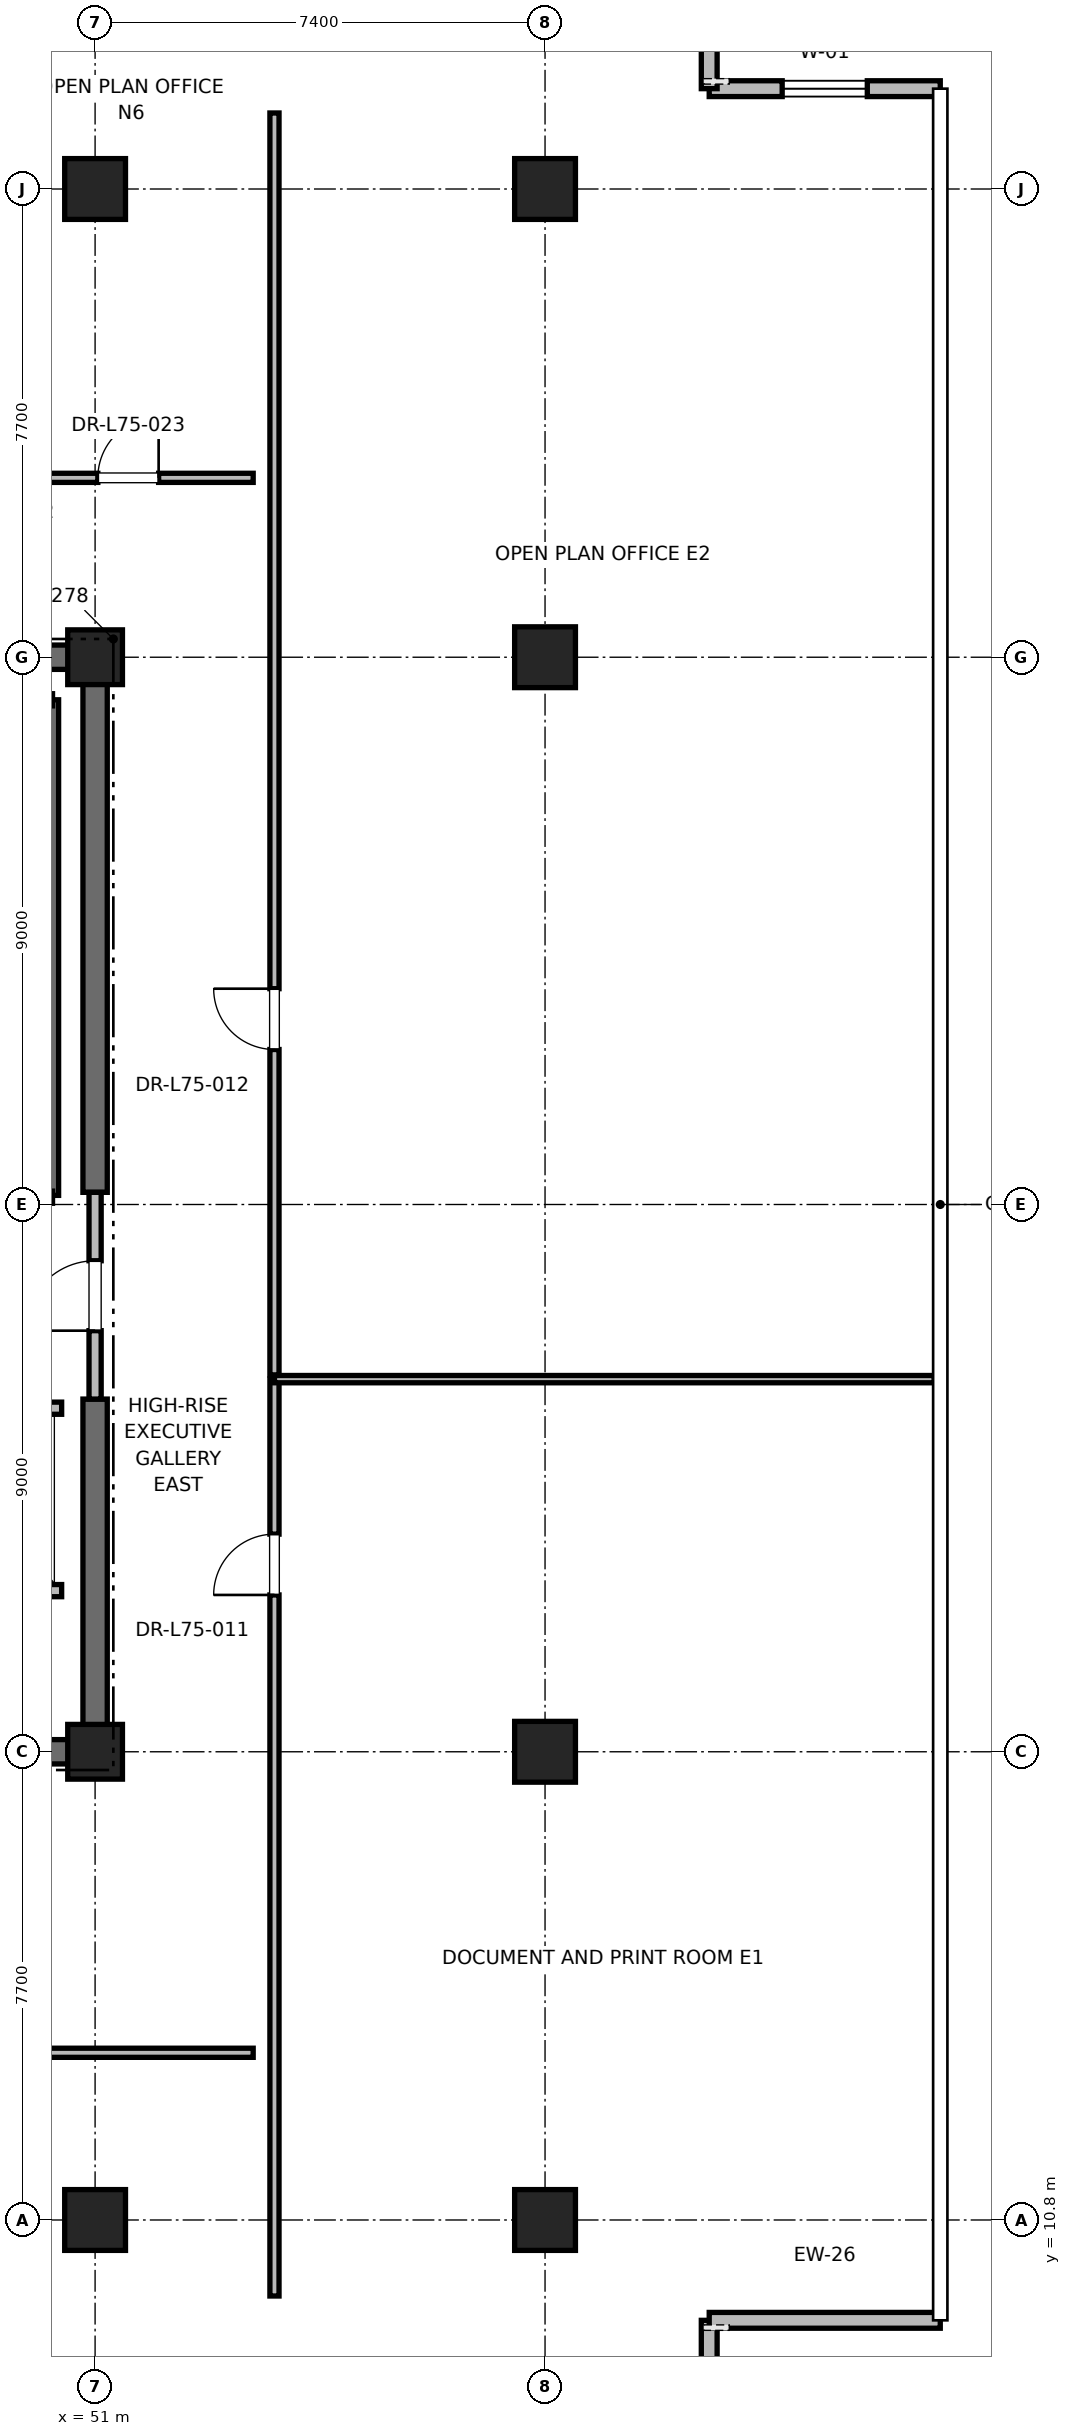
"""IFC4 building model, lengths in metres.
Left out: names, types, materials, properties, quantities, classifications, styles, units other than length and angle.
Written with IfcOpenShell. Run it as: python <this file> out.ifc"""

import sys

from ifc_helpers import new_model, si_unit, direction, frame, frame_2d, origin, origin_2d, place, context, subcontext, project, spatial, rectangle, extrude, element, fill, save


model = new_model("IFC4")
c1 = context("Model", 3, precision=1e-05, world=origin(), true_north=direction((0.0, 1.0)))
c2 = subcontext(c1, "Body", "Model", "MODEL_VIEW")
j1 = project(units=[si_unit("LENGTHUNIT", "METRE"), si_unit("PLANEANGLEUNIT", "RADIAN")], contexts=[c1])
p1 = place(None, origin())
s1 = spatial("IfcSite", under=j1, at=p1, CompositionType="ELEMENT")
p2 = place(p1, origin())
s2 = spatial("IfcBuilding", under=s1, at=p2, CompositionType="ELEMENT")
p3 = place(p2, frame((0.0, 0.0, 322.8)))
s3 = spatial("IfcBuildingStorey", under=s2, at=p3, CompositionType="ELEMENT", Elevation=322.8)
for number, where, z_axis, x_axis in (
    (1, (51.0, 10.8, 0.0), (0.0, 0.0, 1.0), (1.0, 0.0, 0.0)),
    (2, (51.0, 44.2, 0.0), (0.0, 0.0, 1.0), (1.0, 0.0, 0.0)),
    (3, (58.4, 18.5, 0.0), (0.0, 0.0, 1.0), (1.0, 0.0, 0.0)),
    (4, (58.4, 36.5, 0.0), (0.0, 0.0, 1.0), (1.0, 0.0, 0.0)),
    (5, (58.4, 10.8, 0.0), (0.0, 0.0, 1.0), (1.0, 0.0, 0.0)),
    (6, (58.4, 44.2, 0.0), (0.0, 0.0, 1.0), (1.0, 0.0, 0.0)),
):
    element("IfcColumn", number, at=place(p3, frame(where, z_axis=z_axis, x_axis=x_axis)), inside=s3, PredefinedType="COLUMN", context=c2, shape_type="SweptSolid", body=[
        extrude(rectangle(XDim=1.0, YDim=1.0, at=origin_2d()), origin(), (0.0, 0.0, 1.0), 4.0),
    ])
for number, where, z_axis, x_axis in (
    (7, (51.0, 18.5, 0.0), (0.0, 0.0, 1.0), (1.0, 0.0, 0.0)),
    (8, (51.0, 36.5, 0.0), (0.0, 0.0, 1.0), (1.0, 0.0, 0.0)),
):
    element("IfcColumn", number, at=place(p3, frame(where, z_axis=z_axis, x_axis=x_axis)), inside=s3, PredefinedType="PILASTER", context=c2, shape_type="SweptSolid", body=[
        extrude(rectangle(XDim=0.9, YDim=0.9, at=origin_2d()), origin(), (0.0, 0.0, 1.0), 4.0),
    ])
p4 = place(p3, frame((41.8, 18.5, 0.0), z_axis=(0.0, 0.0, 1.0), x_axis=(1.0, 0.0, 0.0)))
e9 = element("IfcWall", 9, at=p4, inside=s3, PredefinedType="SHEAR", context=c2, shape_type="SweptSolid", body=[
    extrude(rectangle(XDim=9.2, YDim=0.4, at=frame_2d((4.6, 0.0))), origin(), (0.0, 0.0, 1.0), 3.785),
])
for number, where, z_axis, x_axis in (
    (10, (45.2, 36.5, 0.0), (0.0, 0.0, 1.0), (1.0, 0.0, 0.0)),
    (11, (51.0, 18.5, 0.0), (0.0, 0.0, 1.0), (0.0, 1.0, 0.0)),
):
    element("IfcWall", number, at=place(p3, frame(where, z_axis=z_axis, x_axis=x_axis)), inside=s3, PredefinedType="SHEAR", context=c2, shape_type="SweptSolid", body=[
        extrude(rectangle(XDim=5.8, YDim=0.4, at=frame_2d((2.9, 0.0))), origin(), (0.0, 0.0, 1.0), 3.785),
    ])
p5 = place(p3, frame((51.0, 27.7, 0.0), z_axis=(0.0, 0.0, 1.0), x_axis=(0.0, 1.0, 0.0)))
e12 = element("IfcWall", 12, at=p5, inside=s3, PredefinedType="SHEAR", context=c2, shape_type="SweptSolid", body=[
    extrude(rectangle(XDim=8.8, YDim=0.4, at=frame_2d((4.4, 0.0))), origin(), (0.0, 0.0, 1.0), 3.785),
])
p6 = place(p3, frame((61.1, 5.85, 0.0), z_axis=(0.0, 0.0, 1.0), x_axis=(0.0, 1.0, 0.0)))
e13 = element("IfcWall", 13, at=p6, inside=s3, PredefinedType="PARAPET", context=c2, shape_type="SweptSolid", body=[
    extrude(rectangle(XDim=3.3, YDim=0.26, at=frame_2d((1.65, 0.0))), origin(), (0.0, 0.0, 1.0), 3.785),
])
p7 = place(p6, frame((0.95, 0.0, 0.85)))
e14 = element("IfcOpeningElement", 14, at=p7, cuts=e13, PredefinedType="OPENING", context=c2, shape_type="SweptSolid", body=[
    extrude(rectangle(XDim=1.4, YDim=2.0, at=frame_2d((0.7, 1.0))), frame((0.0, 0.13, 0.0), z_axis=(0.0, -1.0, 0.0), x_axis=(1.0, 0.0, 0.0)), (0.0, 0.0, 1.0), 0.26),
])
p8 = place(p3, frame((61.1, 9.15, 0.0), z_axis=(0.0, 0.0, 1.0), x_axis=(1.0, 0.0, 0.0)))
e15 = element("IfcWall", 15, at=p8, inside=s3, PredefinedType="PARAPET", context=c2, shape_type="SweptSolid", body=[
    extrude(rectangle(XDim=3.8, YDim=0.26, at=frame_2d((1.9, 0.0))), origin(), (0.0, 0.0, 1.0), 3.785),
])
p9 = place(p3, frame((64.9, 45.85, 0.0), z_axis=(0.0, 0.0, 1.0), x_axis=(-1.0, 0.0, 0.0)))
e16 = element("IfcWall", 16, at=p9, inside=s3, PredefinedType="PARAPET", context=c2, shape_type="SweptSolid", body=[
    extrude(rectangle(XDim=3.8, YDim=0.26, at=frame_2d((1.9, 0.0))), origin(), (0.0, 0.0, 1.0), 3.785),
])
p10 = place(p9, frame((1.2, 0.0, 0.85)))
e17 = element("IfcOpeningElement", 17, at=p10, cuts=e16, PredefinedType="OPENING", context=c2, shape_type="SweptSolid", body=[
    extrude(rectangle(XDim=1.4, YDim=2.0, at=frame_2d((0.7, 1.0))), frame((0.0, 0.13, 0.0), z_axis=(0.0, -1.0, 0.0), x_axis=(1.0, 0.0, 0.0)), (0.0, 0.0, 1.0), 0.26),
])
p11 = place(p3, frame((61.1, 45.85, 0.0), z_axis=(0.0, 0.0, 1.0), x_axis=(0.0, 1.0, 0.0)))
e18 = element("IfcWall", 18, at=p11, inside=s3, PredefinedType="PARAPET", context=c2, shape_type="SweptSolid", body=[
    extrude(rectangle(XDim=3.3, YDim=0.26, at=frame_2d((1.65, 0.0))), origin(), (0.0, 0.0, 1.0), 3.785),
])
p12 = place(p3, frame((50.3, 27.65, 0.0), z_axis=(0.0, 0.0, 1.0), x_axis=(0.0, 1.0, 0.0)))
e19 = element("IfcWall", 19, at=p12, inside=s3, PredefinedType="SOLIDWALL", context=c2, shape_type="SweptSolid", body=[
    extrude(rectangle(XDim=8.15, YDim=0.2, at=frame_2d((4.075, 0.0))), origin(), (0.0, 0.0, 1.0), 3.785),
])
p13 = place(p3, frame((51.0, 24.3, 0.0), z_axis=(0.0, 0.0, 1.0), x_axis=(0.0, 1.0, 0.0)))
e20 = element("IfcWall", 20, at=p13, inside=s3, PredefinedType="PARTITIONING", context=c2, shape_type="SweptSolid", body=[
    extrude(rectangle(XDim=3.4, YDim=0.2, at=frame_2d((1.7, 0.0))), origin(), (0.0, 0.0, 1.0), 2.865),
])
p14 = place(p13, frame((1.125, 0.0, 0.0)))
e21 = element("IfcOpeningElement", 21, at=p14, cuts=e20, PredefinedType="OPENING", context=c2, shape_type="SweptSolid", body=[
    extrude(rectangle(XDim=1.15, YDim=2.2, at=frame_2d((0.575, 1.1))), frame((0.0, 0.1, 0.0), z_axis=(0.0, -1.0, 0.0), x_axis=(1.0, 0.0, 0.0)), (0.0, 0.0, 1.0), 0.2),
])
p15 = place(p3, frame((47.85, 21.15, 0.0), z_axis=(0.0, 0.0, 1.0), x_axis=(1.0, 0.0, 0.0)))
e22 = element("IfcWall", 22, at=p15, inside=s3, PredefinedType="SOLIDWALL", context=c2, shape_type="SweptSolid", body=[
    extrude(rectangle(XDim=2.6, YDim=0.2, at=frame_2d((1.3, 0.0))), origin(), (0.0, 0.0, 1.0), 3.785),
])
p16 = place(p3, frame((50.45, 24.15, 0.0), z_axis=(0.0, 0.0, 1.0), x_axis=(-1.0, 0.0, 0.0)))
e23 = element("IfcWall", 23, at=p16, inside=s3, PredefinedType="SOLIDWALL", context=c2, shape_type="SweptSolid", body=[
    extrude(rectangle(XDim=2.6, YDim=0.2, at=frame_2d((1.3, 0.0))), origin(), (0.0, 0.0, 1.0), 2.865),
])
p17 = place(p16, frame((0.75, 0.0, 0.0)))
e24 = element("IfcOpeningElement", 24, at=p17, cuts=e23, PredefinedType="OPENING", context=c2, shape_type="SweptSolid", body=[
    extrude(rectangle(XDim=1.1, YDim=2.2, at=frame_2d((0.55, 1.1))), frame((0.0, 0.1, 0.0), z_axis=(0.0, -1.0, 0.0), x_axis=(1.0, 0.0, 0.0)), (0.0, 0.0, 1.0), 0.2),
])
p18 = place(p3, frame((49.59, 39.45, 0.0), z_axis=(0.0, 0.0, 1.0), x_axis=(1.0, 0.0, 0.0)))
e25 = element("IfcWall", 25, at=p18, inside=s3, PredefinedType="PARTITIONING", context=c2, shape_type="SweptSolid", body=[
    extrude(rectangle(XDim=4.01, YDim=0.15, at=frame_2d((2.005, 0.0))), origin(), (0.0, 0.0, 1.0), 2.85),
])
p19 = place(p18, frame((1.455, 0.0, 0.0)))
e26 = element("IfcOpeningElement", 26, at=p19, cuts=e25, PredefinedType="OPENING", context=c2, shape_type="SweptSolid", body=[
    extrude(rectangle(XDim=1.0, YDim=2.15, at=frame_2d((0.5, 1.075))), frame((0.0, 0.075, 0.0), z_axis=(0.0, -1.0, 0.0), x_axis=(1.0, 0.0, 0.0)), (0.0, 0.0, 1.0), 0.15),
])
p20 = place(p3, frame((44.694, 13.55, 0.0), z_axis=(0.0, 0.0, 1.0), x_axis=(1.0, 0.0, 0.0)))
e27 = element("IfcWall", 27, at=p20, inside=s3, PredefinedType="PARTITIONING", context=c2, shape_type="SweptSolid", body=[
    extrude(rectangle(XDim=8.906, YDim=0.15, at=frame_2d((4.453, 0.0))), origin(), (0.0, 0.0, 1.0), 2.85),
])
p21 = place(p20, frame((3.903, 0.0, 0.0)))
e28 = element("IfcOpeningElement", 28, at=p21, cuts=e27, PredefinedType="OPENING", context=c2, shape_type="SweptSolid", body=[
    extrude(rectangle(XDim=1.0, YDim=2.15, at=frame_2d((0.5, 1.075))), frame((0.0, 0.075, 0.0), z_axis=(0.0, -1.0, 0.0), x_axis=(1.0, 0.0, 0.0)), (0.0, 0.0, 1.0), 0.15),
])
p22 = place(p3, frame((53.95, 9.55, 0.0), z_axis=(0.0, 0.0, 1.0), x_axis=(0.0, 1.0, 0.0)))
e29 = element("IfcWall", 29, at=p22, inside=s3, PredefinedType="PARTITIONING", context=c2, shape_type="SweptSolid", body=[
    extrude(rectangle(XDim=15.078, YDim=0.15, at=frame_2d((7.539, 0.0))), origin(), (0.0, 0.0, 1.0), 2.85),
])
p23 = place(p22, frame((11.529, 0.0, 0.0)))
e30 = element("IfcOpeningElement", 30, at=p23, cuts=e29, PredefinedType="OPENING", context=c2, shape_type="SweptSolid", body=[
    extrude(rectangle(XDim=1.0, YDim=2.15, at=frame_2d((0.5, 1.075))), frame((0.0, 0.075, 0.0), z_axis=(0.0, -1.0, 0.0), x_axis=(1.0, 0.0, 0.0)), (0.0, 0.0, 1.0), 0.15),
])
p24 = place(p3, frame((53.95, 24.628, 0.0), z_axis=(0.0, 0.0, 1.0), x_axis=(1.0, 0.0, 0.0)))
e31 = element("IfcWall", 31, at=p24, inside=s3, PredefinedType="PARTITIONING", context=c2, shape_type="SweptSolid", body=[
    extrude(rectangle(XDim=10.85, YDim=0.12, at=frame_2d((5.425, 0.0))), origin(), (0.0, 0.0, 1.0), 2.85),
])
p25 = place(p3, frame((53.95, 24.698, 0.0), z_axis=(0.0, 0.0, 1.0), x_axis=(0.0, 1.0, 0.0)))
e32 = element("IfcWall", 32, at=p25, inside=s3, PredefinedType="PARTITIONING", context=c2, shape_type="SweptSolid", body=[
    extrude(rectangle(XDim=20.752, YDim=0.15, at=frame_2d((10.376, 0.0))), origin(), (0.0, 0.0, 1.0), 2.85),
])
p26 = place(p25, frame((5.351, 0.0, 0.0)))
e33 = element("IfcOpeningElement", 33, at=p26, cuts=e32, PredefinedType="OPENING", context=c2, shape_type="SweptSolid", body=[
    extrude(rectangle(XDim=1.0, YDim=2.15, at=frame_2d((0.5, 1.075))), frame((0.0, 0.075, 0.0), z_axis=(0.0, -1.0, 0.0), x_axis=(1.0, 0.0, 0.0)), (0.0, 0.0, 1.0), 0.15),
])
p27 = place(p10, origin())
e34 = element("IfcWindow", 34, at=p27, inside=s3, PartitioningType="SINGLE_PANEL", PredefinedType="WINDOW", context=c2, shape_type="SweptSolid", body=[
    extrude(rectangle(XDim=1.4, YDim=2.0, at=frame_2d((0.7, 1.0))), frame((0.0, 0.03, 0.0), z_axis=(0.0, -1.0, 0.0), x_axis=(1.0, 0.0, 0.0)), (0.0, 0.0, 1.0), 0.06),
])
fill(e17, e34)
p28 = place(p14, origin())
e35 = element("IfcDoor", 35, at=p28, inside=s3, OperationType="SINGLE_SWING_LEFT", PredefinedType="DOOR", context=c2, shape_type="SweptSolid", body=[
    extrude(rectangle(XDim=1.15, YDim=2.2, at=frame_2d((0.575, 1.1))), frame((0.0, 0.025, 0.0), z_axis=(0.0, -1.0, 0.0), x_axis=(1.0, 0.0, 0.0)), (0.0, 0.0, 1.0), 0.05),
])
fill(e21, e35)
p29 = place(p19, origin())
e36 = element("IfcDoor", 36, at=p29, inside=s3, OperationType="SINGLE_SWING_RIGHT", PredefinedType="DOOR", context=c2, shape_type="SweptSolid", body=[
    extrude(rectangle(XDim=1.0, YDim=2.15, at=frame_2d((0.5, 1.075))), frame((0.0, 0.025, 0.0), z_axis=(0.0, -1.0, 0.0), x_axis=(1.0, 0.0, 0.0)), (0.0, 0.0, 1.0), 0.05),
])
fill(e26, e36)
p30 = place(p23, origin())
e37 = element("IfcDoor", 37, at=p30, inside=s3, OperationType="SINGLE_SWING_LEFT", PredefinedType="DOOR", context=c2, shape_type="SweptSolid", body=[
    extrude(rectangle(XDim=1.0, YDim=2.15, at=frame_2d((0.5, 1.075))), frame((0.0, 0.025, 0.0), z_axis=(0.0, -1.0, 0.0), x_axis=(1.0, 0.0, 0.0)), (0.0, 0.0, 1.0), 0.05),
])
fill(e30, e37)
p31 = place(p26, origin())
e38 = element("IfcDoor", 38, at=p31, inside=s3, OperationType="SINGLE_SWING_RIGHT", PredefinedType="DOOR", context=c2, shape_type="SweptSolid", body=[
    extrude(rectangle(XDim=1.0, YDim=2.15, at=frame_2d((0.5, 1.075))), frame((0.0, 0.025, 0.0), z_axis=(0.0, -1.0, 0.0), x_axis=(1.0, 0.0, 0.0)), (0.0, 0.0, 1.0), 0.05),
])
fill(e33, e38)
save(model, sys.argv[1])
